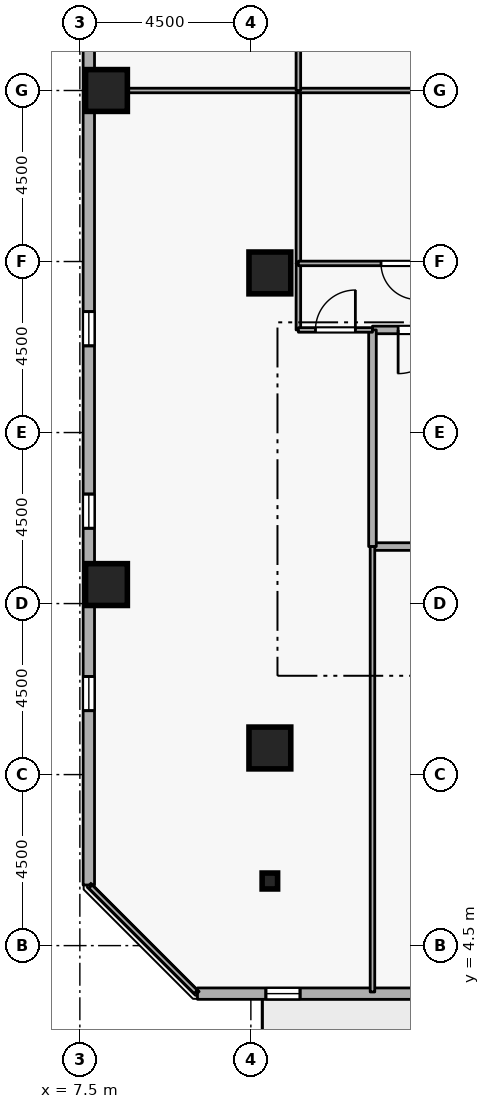
"""IFC4 building model, lengths in metres.
Left out: names, types, materials, properties, quantities, classifications, styles, units other than length and angle.
Written with IfcOpenShell. Run it as: python <this file> out.ifc"""

import sys

from ifc_helpers import new_model, si_unit, direction, frame, frame_2d, origin, origin_2d, place, context, subcontext, project, spatial, rectangle, i_section, extrude, element, fill, save


model = new_model("IFC4")
c1 = context("Model", 3, precision=1e-05, world=origin(), true_north=direction((0.0, 1.0)))
c2 = subcontext(c1, "Body", "Model", "MODEL_VIEW")
j1 = project(units=[si_unit("LENGTHUNIT", "METRE"), si_unit("PLANEANGLEUNIT", "RADIAN")], contexts=[c1])
p1 = place(None, origin())
s1 = spatial("IfcSite", under=j1, at=p1, CompositionType="ELEMENT")
p2 = place(p1, origin())
s2 = spatial("IfcBuilding", under=s1, at=p2, CompositionType="ELEMENT")
p3 = place(p2, frame((0.0, 0.0, 167.1)))
s3 = spatial("IfcBuildingStorey", under=s2, at=p3, CompositionType="ELEMENT", Elevation=167.1)
for number, where, z_axis, x_axis in (
    (1, (12.5, 9.7, 0.0), (0.0, 0.0, 1.0), (1.0, 0.0, 0.0)),
    (2, (8.2, 14.0, 0.0), (0.0, 0.0, 1.0), (1.0, 0.0, 0.0)),
    (3, (8.2, 27.0, 0.0), (0.0, 0.0, 1.0), (1.0, 0.0, 0.0)),
    (4, (12.5, 22.2, 0.0), (0.0, 0.0, 1.0), (1.0, 0.0, 0.0)),
):
    element("IfcColumn", number, at=place(p3, frame(where, z_axis=z_axis, x_axis=x_axis)), inside=s3, PredefinedType="COLUMN", context=c2, shape_type="SweptSolid", body=[
        extrude(rectangle(XDim=1.1, YDim=1.1, at=origin_2d()), origin(), (0.0, 0.0, 1.0), 3.6),
    ])
p4 = place(p3, frame((12.5, 6.2, 0.0), z_axis=(0.0, 0.0, 1.0), x_axis=(1.0, 0.0, 0.0)))
e5 = element("IfcColumn", 5, at=p4, inside=s3, PredefinedType="COLUMN", context=c2, shape_type="SweptSolid", body=[
    extrude(i_section(OverallWidth=0.407, OverallDepth=0.419, WebThickness=0.031, FlangeThickness=0.049, FilletRadius=0.015, at=origin_2d()), origin(), (0.0, 0.0, 1.0), 3.6),
])
p5 = place(p3, frame((10.594, 3.236, 0.0), z_axis=(0.0, 0.0, 1.0), x_axis=(0.999999999634, -2.7061402e-05, 0.0)))
e6 = element("IfcWall", 6, at=p5, inside=s3, PredefinedType="STANDARD", context=c2, shape_type="SweptSolid", body=[
    extrude(rectangle(XDim=36.087, YDim=0.3, at=frame_2d((18.043, 0.0))), origin(), (0.0, 0.0, 1.0), 2.7),
])
p6 = place(p5, frame((22.993, 0.0, 0.0)))
e7 = element("IfcOpeningElement", 7, at=p6, cuts=e6, PredefinedType="OPENING", context=c2, shape_type="SweptSolid", body=[
    extrude(rectangle(XDim=1.0, YDim=2.08, at=frame_2d((0.5, 1.04))), frame((0.0, 0.16, 0.0), z_axis=(0.0, -1.0, 0.0), x_axis=(1.0, 0.0, 0.0)), (0.0, 0.0, 1.0), 0.32),
])
p7 = place(p5, frame((1.8, 0.0, 0.72)))
e8 = element("IfcOpeningElement", 8, at=p7, cuts=e6, PredefinedType="OPENING", context=c2, shape_type="SweptSolid", body=[
    extrude(rectangle(XDim=0.9, YDim=1.75, at=frame_2d((0.45, 0.875))), frame((0.0, 0.16, 0.0), z_axis=(0.0, -1.0, 0.0), x_axis=(1.0, 0.0, 0.0)), (0.0, 0.0, 1.0), 0.32),
])
p8 = place(p5, frame((6.6, 0.0, 0.72)))
e9 = element("IfcOpeningElement", 9, at=p8, cuts=e6, PredefinedType="OPENING", context=c2, shape_type="SweptSolid", body=[
    extrude(rectangle(XDim=0.9, YDim=1.75, at=frame_2d((0.45, 0.875))), frame((0.0, 0.16, 0.0), z_axis=(0.0, -1.0, 0.0), x_axis=(1.0, 0.0, 0.0)), (0.0, 0.0, 1.0), 0.32),
])
p9 = place(p5, frame((11.4, 0.0, 0.72)))
e10 = element("IfcOpeningElement", 10, at=p9, cuts=e6, PredefinedType="OPENING", context=c2, shape_type="SweptSolid", body=[
    extrude(rectangle(XDim=0.9, YDim=1.75, at=frame_2d((0.45, 0.875))), frame((0.0, 0.16, 0.0), z_axis=(0.0, -1.0, 0.0), x_axis=(1.0, 0.0, 0.0)), (0.0, 0.0, 1.0), 0.32),
])
p10 = place(p5, frame((16.2, 0.0, 0.72)))
e11 = element("IfcOpeningElement", 11, at=p10, cuts=e6, PredefinedType="OPENING", context=c2, shape_type="SweptSolid", body=[
    extrude(rectangle(XDim=0.9, YDim=1.75, at=frame_2d((0.45, 0.875))), frame((0.0, 0.16, 0.0), z_axis=(0.0, -1.0, 0.0), x_axis=(1.0, 0.0, 0.0)), (0.0, 0.0, 1.0), 0.32),
])
p11 = place(p5, frame((21.0, 0.0, 0.72)))
e12 = element("IfcOpeningElement", 12, at=p11, cuts=e6, PredefinedType="OPENING", context=c2, shape_type="SweptSolid", body=[
    extrude(rectangle(XDim=0.9, YDim=1.75, at=frame_2d((0.45, 0.875))), frame((0.0, 0.16, 0.0), z_axis=(0.0, -1.0, 0.0), x_axis=(1.0, 0.0, 0.0)), (0.0, 0.0, 1.0), 0.32),
])
p12 = place(p5, frame((25.8, 0.0, 0.72)))
e13 = element("IfcOpeningElement", 13, at=p12, cuts=e6, PredefinedType="OPENING", context=c2, shape_type="SweptSolid", body=[
    extrude(rectangle(XDim=0.9, YDim=1.75, at=frame_2d((0.45, 0.875))), frame((0.0, 0.16, 0.0), z_axis=(0.0, -1.0, 0.0), x_axis=(1.0, 0.0, 0.0)), (0.0, 0.0, 1.0), 0.32),
])
p13 = place(p5, frame((30.6, 0.0, 0.72)))
e14 = element("IfcOpeningElement", 14, at=p13, cuts=e6, PredefinedType="OPENING", context=c2, shape_type="SweptSolid", body=[
    extrude(rectangle(XDim=0.9, YDim=1.75, at=frame_2d((0.45, 0.875))), frame((0.0, 0.16, 0.0), z_axis=(0.0, -1.0, 0.0), x_axis=(1.0, 0.0, 0.0)), (0.0, 0.0, 1.0), 0.32),
])
p14 = place(p3, frame((7.735, 42.181, 0.0), z_axis=(0.0, 0.0, 1.0), x_axis=(2.7061402e-05, -0.999999999634, 0.0)))
e15 = element("IfcWall", 15, at=p14, inside=s3, PredefinedType="STANDARD", context=c2, shape_type="SweptSolid", body=[
    extrude(rectangle(XDim=36.087, YDim=0.3, at=frame_2d((18.043, 0.0))), origin(), (0.0, 0.0, 1.0), 2.7),
])
p15 = place(p14, frame((6.6, 0.0, 0.72)))
e16 = element("IfcOpeningElement", 16, at=p15, cuts=e15, PredefinedType="OPENING", context=c2, shape_type="SweptSolid", body=[
    extrude(rectangle(XDim=0.9, YDim=1.75, at=frame_2d((0.45, 0.875))), frame((0.0, 0.16, 0.0), z_axis=(0.0, -1.0, 0.0), x_axis=(1.0, 0.0, 0.0)), (0.0, 0.0, 1.0), 0.32),
])
p16 = place(p14, frame((11.4, 0.0, 0.72)))
e17 = element("IfcOpeningElement", 17, at=p16, cuts=e15, PredefinedType="OPENING", context=c2, shape_type="SweptSolid", body=[
    extrude(rectangle(XDim=0.9, YDim=1.75, at=frame_2d((0.45, 0.875))), frame((0.0, 0.16, 0.0), z_axis=(0.0, -1.0, 0.0), x_axis=(1.0, 0.0, 0.0)), (0.0, 0.0, 1.0), 0.32),
])
p17 = place(p14, frame((21.0, 0.0, 0.72)))
e18 = element("IfcOpeningElement", 18, at=p17, cuts=e15, PredefinedType="OPENING", context=c2, shape_type="SweptSolid", body=[
    extrude(rectangle(XDim=0.9, YDim=1.75, at=frame_2d((0.45, 0.875))), frame((0.0, 0.16, 0.0), z_axis=(0.0, -1.0, 0.0), x_axis=(1.0, 0.0, 0.0)), (0.0, 0.0, 1.0), 0.32),
])
p18 = place(p14, frame((25.8, 0.0, 0.72)))
e19 = element("IfcOpeningElement", 19, at=p18, cuts=e15, PredefinedType="OPENING", context=c2, shape_type="SweptSolid", body=[
    extrude(rectangle(XDim=0.9, YDim=1.75, at=frame_2d((0.45, 0.875))), frame((0.0, 0.16, 0.0), z_axis=(0.0, -1.0, 0.0), x_axis=(1.0, 0.0, 0.0)), (0.0, 0.0, 1.0), 0.32),
])
p19 = place(p14, frame((30.6, 0.0, 0.72)))
e20 = element("IfcOpeningElement", 20, at=p19, cuts=e15, PredefinedType="OPENING", context=c2, shape_type="SweptSolid", body=[
    extrude(rectangle(XDim=0.9, YDim=1.75, at=frame_2d((0.45, 0.875))), frame((0.0, 0.16, 0.0), z_axis=(0.0, -1.0, 0.0), x_axis=(1.0, 0.0, 0.0)), (0.0, 0.0, 1.0), 0.32),
])
p20 = place(p3, frame((15.2, 15.0, 0.0), z_axis=(0.0, 0.0, 1.0), x_axis=(1.0, 0.0, 0.0)))
e21 = element("IfcWall", 21, at=p20, inside=s3, PredefinedType="STANDARD", context=c2, shape_type="SweptSolid", body=[
    extrude(rectangle(XDim=2.5, YDim=0.2, at=frame_2d((1.25, 0.0))), origin(), (0.0, 0.0, 1.0), 3.34),
])
p21 = place(p3, frame((17.7, 20.7, 0.0), z_axis=(0.0, 0.0, 1.0), x_axis=(-1.0, 0.0, 0.0)))
e22 = element("IfcWall", 22, at=p21, inside=s3, PredefinedType="STANDARD", context=c2, shape_type="SweptSolid", body=[
    extrude(rectangle(XDim=2.5, YDim=0.2, at=frame_2d((1.25, 0.0))), origin(), (0.0, 0.0, 1.0), 3.34),
])
p22 = place(p21, frame((0.675, 0.0, 0.0)))
e23 = element("IfcOpeningElement", 23, at=p22, cuts=e22, PredefinedType="OPENING", context=c2, shape_type="SweptSolid", body=[
    extrude(rectangle(XDim=1.15, YDim=2.1, at=frame_2d((0.575, 1.05))), frame((0.0, 0.11, 0.0), z_axis=(0.0, -1.0, 0.0), x_axis=(1.0, 0.0, 0.0)), (0.0, 0.0, 1.0), 0.22),
])
p23 = place(p3, frame((15.2, 20.7, 0.0), z_axis=(0.0, 0.0, 1.0), x_axis=(0.0, -1.0, 0.0)))
e24 = element("IfcWall", 24, at=p23, inside=s3, PredefinedType="STANDARD", context=c2, shape_type="SweptSolid", body=[
    extrude(rectangle(XDim=5.7, YDim=0.2, at=frame_2d((2.85, 0.0))), origin(), (0.0, 0.0, 1.0), 3.34),
])
p24 = place(p3, frame((13.25, 27.0, 0.0), z_axis=(0.0, 0.0, 1.0), x_axis=(0.0, -1.0, 0.0)))
e25 = element("IfcWall", 25, at=p24, inside=s3, PredefinedType="PARTITIONING", context=c2, shape_type="SweptSolid", body=[
    extrude(rectangle(XDim=4.55, YDim=0.12, at=frame_2d((2.275, 0.0))), origin(), (0.0, 0.0, 1.0), 3.34),
])
p25 = place(p3, frame((13.25, 22.45, 0.0), z_axis=(0.0, 0.0, 1.0), x_axis=(0.0, -1.0, 0.0)))
e26 = element("IfcWall", 26, at=p25, inside=s3, PredefinedType="PARTITIONING", context=c2, shape_type="SweptSolid", body=[
    extrude(rectangle(XDim=1.75, YDim=0.12, at=frame_2d((0.875, 0.0))), origin(), (0.0, 0.0, 1.0), 3.34),
])
p26 = place(p3, frame((13.25, 20.7, 0.0), z_axis=(0.0, 0.0, 1.0), x_axis=(1.0, 0.0, 0.0)))
e27 = element("IfcWall", 27, at=p26, inside=s3, PredefinedType="PARTITIONING", context=c2, shape_type="SweptSolid", body=[
    extrude(rectangle(XDim=1.95, YDim=0.12, at=frame_2d((0.975, 0.0))), origin(), (0.0, 0.0, 1.0), 3.34),
])
p27 = place(p26, frame((0.45, 0.0, 0.0)))
e28 = element("IfcOpeningElement", 28, at=p27, cuts=e27, PredefinedType="OPENING", context=c2, shape_type="SweptSolid", body=[
    extrude(rectangle(XDim=1.05, YDim=2.1, at=frame_2d((0.525, 1.05))), frame((0.0, 0.07, 0.0), z_axis=(0.0, -1.0, 0.0), x_axis=(1.0, 0.0, 0.0)), (0.0, 0.0, 1.0), 0.14),
])
p28 = place(p3, frame((15.2, 15.0, 0.0), z_axis=(0.0, 0.0, 1.0), x_axis=(0.0, -1.0, 0.0)))
e29 = element("IfcWall", 29, at=p28, inside=s3, PredefinedType="PARTITIONING", context=c2, shape_type="SweptSolid", body=[
    extrude(rectangle(XDim=11.72, YDim=0.12, at=frame_2d((5.86, 0.0))), origin(), (0.0, 0.0, 1.0), 3.34),
])
p29 = place(p3, frame((10.552, 3.28, 0.0), z_axis=(0.0, 0.0, 1.0), x_axis=(-0.707106781187, 0.707106781187, 0.0)))
e30 = element("IfcWall", 30, at=p29, inside=s3, PredefinedType="PARTITIONING", context=c2, shape_type="SweptSolid", body=[
    extrude(rectangle(XDim=3.919, YDim=0.12, at=frame_2d((1.96, 0.0))), origin(), (0.0, 0.0, 1.0), 3.34),
])
p30 = place(p3, frame((7.78, 27.0, 0.0), z_axis=(0.0, 0.0, 1.0), x_axis=(1.0, 0.0, 0.0)))
e31 = element("IfcWall", 31, at=p30, inside=s3, PredefinedType="PARTITIONING", context=c2, shape_type="SweptSolid", body=[
    extrude(rectangle(XDim=5.47, YDim=0.12, at=frame_2d((2.735, 0.0))), origin(), (0.0, 0.0, 1.0), 2.882),
])
p31 = place(p3, frame((13.25, 27.0, 0.0), z_axis=(0.0, 0.0, 1.0), x_axis=(1.0, 0.0, 0.0)))
e32 = element("IfcWall", 32, at=p31, inside=s3, PredefinedType="PARTITIONING", context=c2, shape_type="SweptSolid", body=[
    extrude(rectangle(XDim=5.3, YDim=0.12, at=frame_2d((2.65, 0.0))), origin(), (0.0, 0.0, 1.0), 2.882),
])
p32 = place(p3, frame((18.55, 22.45, 0.0), z_axis=(0.0, 0.0, 1.0), x_axis=(-1.0, 0.0, 0.0)))
e33 = element("IfcWall", 33, at=p32, inside=s3, PredefinedType="PARTITIONING", context=c2, shape_type="SweptSolid", body=[
    extrude(rectangle(XDim=5.3, YDim=0.12, at=frame_2d((2.65, 0.0))), origin(), (0.0, 0.0, 1.0), 3.34),
])
p33 = place(p32, frame((2.175, 0.0, 0.0)))
e34 = element("IfcOpeningElement", 34, at=p33, cuts=e33, PredefinedType="OPENING", context=c2, shape_type="SweptSolid", body=[
    extrude(rectangle(XDim=0.95, YDim=2.1, at=frame_2d((0.475, 1.05))), frame((0.0, 0.07, 0.0), z_axis=(0.0, -1.0, 0.0), x_axis=(1.0, 0.0, 0.0)), (0.0, 0.0, 1.0), 0.14),
])
p34 = place(p3, frame((13.25, 27.0, 0.0), z_axis=(0.0, 0.0, 1.0), x_axis=(0.0, 1.0, 0.0)))
e35 = element("IfcWall", 35, at=p34, inside=s3, PredefinedType="PARTITIONING", context=c2, shape_type="SweptSolid", body=[
    extrude(rectangle(XDim=2.3, YDim=0.12, at=frame_2d((1.15, 0.0))), origin(), (0.0, 0.0, 1.0), 3.34),
])
p35 = place(p7, origin())
e36 = element("IfcWindow", 36, at=p35, inside=s3, PartitioningType="SINGLE_PANEL", PredefinedType="WINDOW", context=c2, shape_type="SweptSolid", body=[
    extrude(rectangle(XDim=0.9, YDim=1.75, at=frame_2d((0.45, 0.875))), frame((0.0, 0.03, 0.0), z_axis=(0.0, -1.0, 0.0), x_axis=(1.0, 0.0, 0.0)), (0.0, 0.0, 1.0), 0.06),
])
fill(e8, e36)
p36 = place(p17, origin())
e37 = element("IfcWindow", 37, at=p36, inside=s3, PartitioningType="SINGLE_PANEL", PredefinedType="WINDOW", context=c2, shape_type="SweptSolid", body=[
    extrude(rectangle(XDim=0.9, YDim=1.75, at=frame_2d((0.45, 0.875))), frame((0.0, 0.03, 0.0), z_axis=(0.0, -1.0, 0.0), x_axis=(1.0, 0.0, 0.0)), (0.0, 0.0, 1.0), 0.06),
])
fill(e18, e37)
p37 = place(p18, origin())
e38 = element("IfcWindow", 38, at=p37, inside=s3, PartitioningType="SINGLE_PANEL", PredefinedType="WINDOW", context=c2, shape_type="SweptSolid", body=[
    extrude(rectangle(XDim=0.9, YDim=1.75, at=frame_2d((0.45, 0.875))), frame((0.0, 0.03, 0.0), z_axis=(0.0, -1.0, 0.0), x_axis=(1.0, 0.0, 0.0)), (0.0, 0.0, 1.0), 0.06),
])
fill(e19, e38)
p38 = place(p19, origin())
e39 = element("IfcWindow", 39, at=p38, inside=s3, PartitioningType="SINGLE_PANEL", PredefinedType="WINDOW", context=c2, shape_type="SweptSolid", body=[
    extrude(rectangle(XDim=0.9, YDim=1.75, at=frame_2d((0.45, 0.875))), frame((0.0, 0.03, 0.0), z_axis=(0.0, -1.0, 0.0), x_axis=(1.0, 0.0, 0.0)), (0.0, 0.0, 1.0), 0.06),
])
fill(e20, e39)
p39 = place(p22, origin())
e40 = element("IfcDoor", 40, at=p39, inside=s3, OperationType="SINGLE_SWING_RIGHT", PredefinedType="DOOR", context=c2, shape_type="SweptSolid", body=[
    extrude(rectangle(XDim=1.15, YDim=2.1, at=frame_2d((0.575, 1.05))), frame((0.0, 0.025, 0.0), z_axis=(0.0, -1.0, 0.0), x_axis=(1.0, 0.0, 0.0)), (0.0, 0.0, 1.0), 0.05),
])
fill(e23, e40)
p40 = place(p27, origin())
e41 = element("IfcDoor", 41, at=p40, inside=s3, OperationType="SINGLE_SWING_RIGHT", PredefinedType="DOOR", context=c2, shape_type="SweptSolid", body=[
    extrude(rectangle(XDim=1.05, YDim=2.1, at=frame_2d((0.525, 1.05))), frame((0.0, 0.025, 0.0), z_axis=(0.0, -1.0, 0.0), x_axis=(1.0, 0.0, 0.0)), (0.0, 0.0, 1.0), 0.05),
])
fill(e28, e41)
p41 = place(p33, origin())
e42 = element("IfcDoor", 42, at=p41, inside=s3, OperationType="SINGLE_SWING_LEFT", PredefinedType="DOOR", context=c2, shape_type="SweptSolid", body=[
    extrude(rectangle(XDim=0.95, YDim=2.1, at=frame_2d((0.475, 1.05))), frame((0.0, 0.025, 0.0), z_axis=(0.0, -1.0, 0.0), x_axis=(1.0, 0.0, 0.0)), (0.0, 0.0, 1.0), 0.05),
])
fill(e34, e42)
save(model, sys.argv[1])
